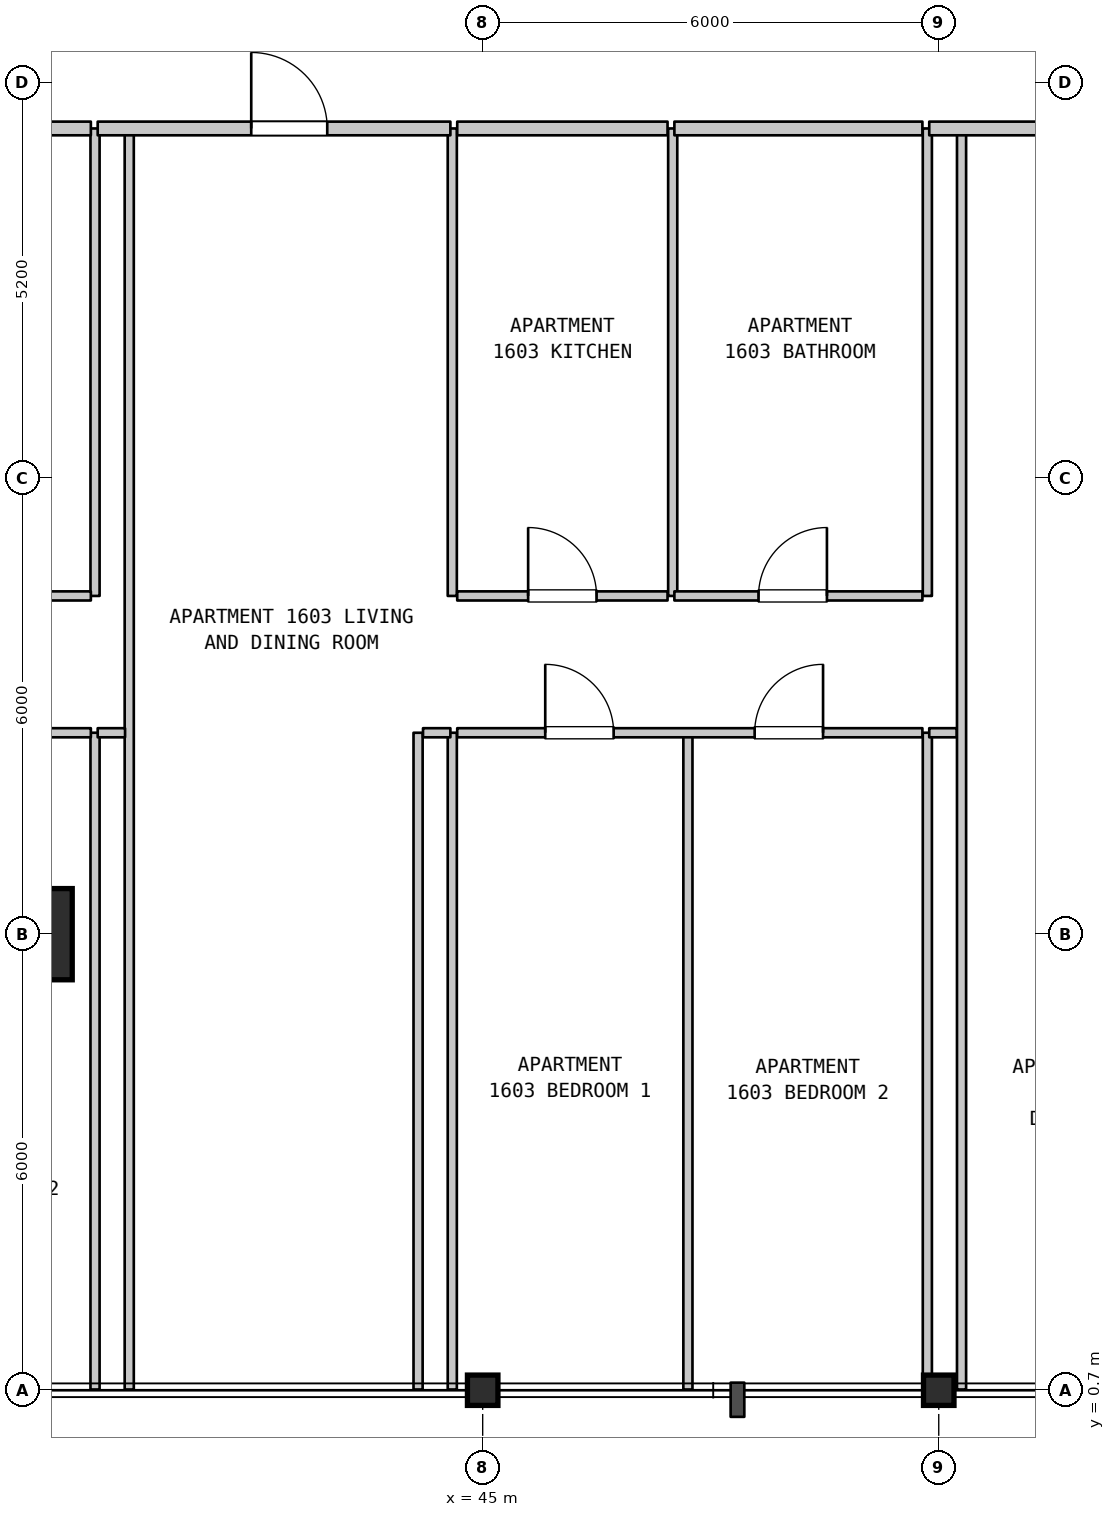
"""IFC4 building model, lengths in metres.
Left out: names, types, materials, properties, quantities, classifications, styles, units other than length and angle.
Written with IfcOpenShell. Run it as: python <this file> out.ifc"""

import sys

from ifc_helpers import new_model, si_unit, direction, frame, frame_2d, origin, origin_2d, place, context, subcontext, project, spatial, rectangle, i_section, extrude, element, fill, save


model = new_model("IFC4")
c1 = context("Model", 3, precision=1e-05, world=origin(), true_north=direction((0.0, 1.0)))
c2 = subcontext(c1, "Body", "Model", "MODEL_VIEW")
j1 = project(units=[si_unit("LENGTHUNIT", "METRE"), si_unit("PLANEANGLEUNIT", "RADIAN")], contexts=[c1])
p1 = place(None, origin())
s1 = spatial("IfcSite", under=j1, at=p1, CompositionType="ELEMENT")
p2 = place(p1, origin())
s2 = spatial("IfcBuilding", under=s1, at=p2, CompositionType="ELEMENT")
p3 = place(p2, frame((0.0, 0.0, 70.1)))
s3 = spatial("IfcBuildingStorey", under=s2, at=p3, CompositionType="ELEMENT", Elevation=70.1)
p4 = place(p3, frame((39.0, 6.7, 0.0), z_axis=(0.0, 0.0, 1.0), x_axis=(1.0, 0.0, 0.0)))
e1 = element("IfcColumn", 1, at=p4, inside=s3, PredefinedType="COLUMN", context=c2, shape_type="SweptSolid", body=[
    extrude(rectangle(XDim=1.2, YDim=1.2, at=origin_2d()), origin(), (0.0, 0.0, 1.0), 3.7),
])
for number, where, z_axis, x_axis in (
    (2, (45.0, 0.7, 0.0), (0.0, 0.0, 1.0), (1.0, 0.0, 0.0)),
    (3, (51.0, 0.7, 0.0), (0.0, 0.0, 1.0), (1.0, 0.0, 0.0)),
):
    element("IfcColumn", number, at=place(p3, frame(where, z_axis=z_axis, x_axis=x_axis)), inside=s3, PredefinedType="COLUMN", context=c2, shape_type="SweptSolid", body=[
        extrude(i_section(OverallWidth=0.401, OverallDepth=0.399, WebThickness=0.025, FlangeThickness=0.04, FilletRadius=0.015, at=origin_2d()), origin(), (0.0, 0.0, 1.0), 3.7),
    ])
p5 = place(p3, frame((39.9, 0.71, 0.0), z_axis=(0.0, 0.0, 1.0), x_axis=(0.0, 1.0, 0.0)))
e4 = element("IfcWall", 4, at=p5, inside=s3, PredefinedType="PARTITIONING", context=c2, shape_type="SweptSolid", body=[
    extrude(rectangle(XDim=8.64, YDim=0.12, at=frame_2d((4.32, 0.0))), origin(), (0.0, 0.0, 1.0), 3.385),
])
p6 = place(p3, frame((39.9, 11.15, 0.0), z_axis=(0.0, 0.0, 1.0), x_axis=(0.0, 1.0, 0.0)))
e5 = element("IfcWall", 5, at=p6, inside=s3, PredefinedType="PARTITIONING", context=c2, shape_type="SweptSolid", body=[
    extrude(rectangle(XDim=6.15, YDim=0.12, at=frame_2d((3.075, 0.0))), origin(), (0.0, 0.0, 1.0), 3.385),
])
p7 = place(p3, frame((40.35, 0.71, 0.0), z_axis=(0.0, 0.0, 1.0), x_axis=(0.0, 1.0, 0.0)))
e6 = element("IfcWall", 6, at=p7, inside=s3, PredefinedType="PARTITIONING", context=c2, shape_type="SweptSolid", body=[
    extrude(rectangle(XDim=16.59, YDim=0.12, at=frame_2d((8.295, 0.0))), origin(), (0.0, 0.0, 1.0), 3.385),
])
for number, where, z_axis, x_axis in (
    (7, (44.15, 0.71, 0.0), (0.0, 0.0, 1.0), (0.0, 1.0, 0.0)),
    (8, (44.6, 0.71, 0.0), (0.0, 0.0, 1.0), (0.0, 1.0, 0.0)),
):
    element("IfcWall", number, at=place(p3, frame(where, z_axis=z_axis, x_axis=x_axis)), inside=s3, PredefinedType="PARTITIONING", context=c2, shape_type="SweptSolid", body=[
        extrude(rectangle(XDim=8.64, YDim=0.12, at=frame_2d((4.32, 0.0))), origin(), (0.0, 0.0, 1.0), 3.385),
    ])
for number, where, z_axis, x_axis in (
    (9, (44.6, 11.15, 0.0), (0.0, 0.0, 1.0), (0.0, 1.0, 0.0)),
    (10, (47.5, 11.15, 0.0), (0.0, 0.0, 1.0), (0.0, 1.0, 0.0)),
):
    element("IfcWall", number, at=place(p3, frame(where, z_axis=z_axis, x_axis=x_axis)), inside=s3, PredefinedType="PARTITIONING", context=c2, shape_type="SweptSolid", body=[
        extrude(rectangle(XDim=6.15, YDim=0.12, at=frame_2d((3.075, 0.0))), origin(), (0.0, 0.0, 1.0), 3.385),
    ])
for number, where, z_axis, x_axis in (
    (11, (47.7, 0.71, 0.0), (0.0, 0.0, 1.0), (0.0, 1.0, 0.0)),
    (12, (50.85, 0.71, 0.0), (0.0, 0.0, 1.0), (0.0, 1.0, 0.0)),
):
    element("IfcWall", number, at=place(p3, frame(where, z_axis=z_axis, x_axis=x_axis)), inside=s3, PredefinedType="PARTITIONING", context=c2, shape_type="SweptSolid", body=[
        extrude(rectangle(XDim=8.64, YDim=0.12, at=frame_2d((4.32, 0.0))), origin(), (0.0, 0.0, 1.0), 3.385),
    ])
p8 = place(p3, frame((50.85, 11.15, 0.0), z_axis=(0.0, 0.0, 1.0), x_axis=(0.0, 1.0, 0.0)))
e13 = element("IfcWall", 13, at=p8, inside=s3, PredefinedType="PARTITIONING", context=c2, shape_type="SweptSolid", body=[
    extrude(rectangle(XDim=6.15, YDim=0.12, at=frame_2d((3.075, 0.0))), origin(), (0.0, 0.0, 1.0), 3.385),
])
p9 = place(p3, frame((51.3, 0.71, 0.0), z_axis=(0.0, 0.0, 1.0), x_axis=(0.0, 1.0, 0.0)))
e14 = element("IfcWall", 14, at=p9, inside=s3, PredefinedType="PARTITIONING", context=c2, shape_type="SweptSolid", body=[
    extrude(rectangle(XDim=16.59, YDim=0.12, at=frame_2d((8.295, 0.0))), origin(), (0.0, 0.0, 1.0), 3.385),
])
p10 = place(p3, frame((33.785, 9.35, 0.0), z_axis=(0.0, 0.0, 1.0), x_axis=(1.0, 0.0, 0.0)))
e15 = element("IfcWall", 15, at=p10, inside=s3, PredefinedType="PARTITIONING", context=c2, shape_type="SweptSolid", body=[
    extrude(rectangle(XDim=6.06, YDim=0.12, at=frame_2d((3.03, 0.0))), origin(), (0.0, 0.0, 1.0), 3.385),
])
p11 = place(p10, frame((1.144, 0.0, 0.0)))
e16 = element("IfcOpeningElement", 16, at=p11, cuts=e15, PredefinedType="OPENING", context=c2, shape_type="SweptSolid", body=[
    extrude(rectangle(XDim=0.9, YDim=2.15, at=frame_2d((0.45, 1.075))), frame((0.0, 0.07, 0.0), z_axis=(0.0, -1.0, 0.0), x_axis=(1.0, 0.0, 0.0)), (0.0, 0.0, 1.0), 0.14),
])
p12 = place(p10, frame((3.869, 0.0, 0.0)))
e17 = element("IfcOpeningElement", 17, at=p12, cuts=e15, PredefinedType="OPENING", context=c2, shape_type="SweptSolid", body=[
    extrude(rectangle(XDim=0.9, YDim=2.15, at=frame_2d((0.45, 1.075))), frame((0.0, 0.07, 0.0), z_axis=(0.0, -1.0, 0.0), x_axis=(1.0, 0.0, 0.0)), (0.0, 0.0, 1.0), 0.14),
])
for number, where, z_axis, x_axis in (
    (18, (39.935, 9.35, 0.0), (0.0, 0.0, 1.0), (1.0, 0.0, 0.0)),
    (19, (44.215, 9.35, 0.0), (0.0, 0.0, 1.0), (1.0, 0.0, 0.0)),
):
    element("IfcWall", number, at=place(p3, frame(where, z_axis=z_axis, x_axis=x_axis)), inside=s3, PredefinedType="PARTITIONING", context=c2, shape_type="SweptSolid", body=[
        extrude(rectangle(XDim=0.36, YDim=0.12, at=frame_2d((0.18, 0.0))), origin(), (0.0, 0.0, 1.0), 3.385),
    ])
p13 = place(p3, frame((44.665, 9.35, 0.0), z_axis=(0.0, 0.0, 1.0), x_axis=(1.0, 0.0, 0.0)))
e20 = element("IfcWall", 20, at=p13, inside=s3, PredefinedType="PARTITIONING", context=c2, shape_type="SweptSolid", body=[
    extrude(rectangle(XDim=6.12, YDim=0.12, at=frame_2d((3.06, 0.0))), origin(), (0.0, 0.0, 1.0), 3.385),
])
p14 = place(p13, frame((1.158, 0.0, 0.0)))
e21 = element("IfcOpeningElement", 21, at=p14, cuts=e20, PredefinedType="OPENING", context=c2, shape_type="SweptSolid", body=[
    extrude(rectangle(XDim=0.9, YDim=2.15, at=frame_2d((0.45, 1.075))), frame((0.0, 0.07, 0.0), z_axis=(0.0, -1.0, 0.0), x_axis=(1.0, 0.0, 0.0)), (0.0, 0.0, 1.0), 0.14),
])
p15 = place(p13, frame((3.913, 0.0, 0.0)))
e22 = element("IfcOpeningElement", 22, at=p15, cuts=e20, PredefinedType="OPENING", context=c2, shape_type="SweptSolid", body=[
    extrude(rectangle(XDim=0.9, YDim=2.15, at=frame_2d((0.45, 1.075))), frame((0.0, 0.07, 0.0), z_axis=(0.0, -1.0, 0.0), x_axis=(1.0, 0.0, 0.0)), (0.0, 0.0, 1.0), 0.14),
])
p16 = place(p3, frame((50.875, 9.35, 0.0), z_axis=(0.0, 0.0, 1.0), x_axis=(1.0, 0.0, 0.0)))
e23 = element("IfcWall", 23, at=p16, inside=s3, PredefinedType="PARTITIONING", context=c2, shape_type="SweptSolid", body=[
    extrude(rectangle(XDim=0.36, YDim=0.12, at=frame_2d((0.18, 0.0))), origin(), (0.0, 0.0, 1.0), 3.385),
])
p17 = place(p3, frame((36.614, 11.15, 0.0), z_axis=(0.0, 0.0, 1.0), x_axis=(1.0, 0.0, 0.0)))
e24 = element("IfcWall", 24, at=p17, inside=s3, PredefinedType="PARTITIONING", context=c2, shape_type="SweptSolid", body=[
    extrude(rectangle(XDim=3.231, YDim=0.12, at=frame_2d((1.615, 0.0))), origin(), (0.0, 0.0, 1.0), 3.385),
])
p18 = place(p17, frame((1.092, 0.0, 0.0)))
e25 = element("IfcOpeningElement", 25, at=p18, cuts=e24, PredefinedType="OPENING", context=c2, shape_type="SweptSolid", body=[
    extrude(rectangle(XDim=0.9, YDim=2.1, at=frame_2d((0.45, 1.05))), frame((0.0, 0.07, 0.0), z_axis=(0.0, -1.0, 0.0), x_axis=(1.0, 0.0, 0.0)), (0.0, 0.0, 1.0), 0.14),
])
p19 = place(p3, frame((44.665, 11.15, 0.0), z_axis=(0.0, 0.0, 1.0), x_axis=(1.0, 0.0, 0.0)))
e26 = element("IfcWall", 26, at=p19, inside=s3, PredefinedType="PARTITIONING", context=c2, shape_type="SweptSolid", body=[
    extrude(rectangle(XDim=2.767, YDim=0.12, at=frame_2d((1.383, 0.0))), origin(), (0.0, 0.0, 1.0), 3.385),
])
p20 = place(p19, frame((0.933, 0.0, 0.0)))
e27 = element("IfcOpeningElement", 27, at=p20, cuts=e26, PredefinedType="OPENING", context=c2, shape_type="SweptSolid", body=[
    extrude(rectangle(XDim=0.9, YDim=2.15, at=frame_2d((0.45, 1.075))), frame((0.0, 0.07, 0.0), z_axis=(0.0, -1.0, 0.0), x_axis=(1.0, 0.0, 0.0)), (0.0, 0.0, 1.0), 0.14),
])
p21 = place(p3, frame((47.522, 11.15, 0.0), z_axis=(0.0, 0.0, 1.0), x_axis=(1.0, 0.0, 0.0)))
e28 = element("IfcWall", 28, at=p21, inside=s3, PredefinedType="PARTITIONING", context=c2, shape_type="SweptSolid", body=[
    extrude(rectangle(XDim=3.263, YDim=0.12, at=frame_2d((1.631, 0.0))), origin(), (0.0, 0.0, 1.0), 3.385),
])
p22 = place(p21, frame((1.107, 0.0, 0.0)))
e29 = element("IfcOpeningElement", 29, at=p22, cuts=e28, PredefinedType="OPENING", context=c2, shape_type="SweptSolid", body=[
    extrude(rectangle(XDim=0.9, YDim=2.1, at=frame_2d((0.45, 1.05))), frame((0.0, 0.07, 0.0), z_axis=(0.0, -1.0, 0.0), x_axis=(1.0, 0.0, 0.0)), (0.0, 0.0, 1.0), 0.14),
])
p23 = place(p3, frame((36.614, 17.3, 0.0), z_axis=(0.0, 0.0, 1.0), x_axis=(1.0, 0.0, 0.0)))
e30 = element("IfcWall", 30, at=p23, inside=s3, PredefinedType="STANDARD", context=c2, shape_type="SweptSolid", body=[
    extrude(rectangle(XDim=3.231, YDim=0.18, at=frame_2d((1.615, 0.0))), origin(), (0.0, 0.0, 1.0), 3.385),
])
p24 = place(p3, frame((39.935, 17.3, 0.0), z_axis=(0.0, 0.0, 1.0), x_axis=(1.0, 0.0, 0.0)))
e31 = element("IfcWall", 31, at=p24, inside=s3, PredefinedType="STANDARD", context=c2, shape_type="SweptSolid", body=[
    extrude(rectangle(XDim=4.64, YDim=0.18, at=frame_2d((2.32, 0.0))), origin(), (0.0, 0.0, 1.0), 3.385),
])
p25 = place(p24, frame((2.02, 0.0, 0.0)))
e32 = element("IfcOpeningElement", 32, at=p25, cuts=e31, PredefinedType="OPENING", context=c2, shape_type="SweptSolid", body=[
    extrude(rectangle(XDim=1.0, YDim=2.15, at=frame_2d((0.5, 1.075))), frame((0.0, 0.1, 0.0), z_axis=(0.0, -1.0, 0.0), x_axis=(1.0, 0.0, 0.0)), (0.0, 0.0, 1.0), 0.2),
])
p26 = place(p3, frame((44.665, 17.3, 0.0), z_axis=(0.0, 0.0, 1.0), x_axis=(1.0, 0.0, 0.0)))
e33 = element("IfcWall", 33, at=p26, inside=s3, PredefinedType="STANDARD", context=c2, shape_type="SweptSolid", body=[
    extrude(rectangle(XDim=2.767, YDim=0.18, at=frame_2d((1.383, 0.0))), origin(), (0.0, 0.0, 1.0), 3.385),
])
p27 = place(p3, frame((47.522, 17.3, 0.0), z_axis=(0.0, 0.0, 1.0), x_axis=(1.0, 0.0, 0.0)))
e34 = element("IfcWall", 34, at=p27, inside=s3, PredefinedType="STANDARD", context=c2, shape_type="SweptSolid", body=[
    extrude(rectangle(XDim=3.263, YDim=0.18, at=frame_2d((1.631, 0.0))), origin(), (0.0, 0.0, 1.0), 3.385),
])
p28 = place(p3, frame((50.875, 17.3, 0.0), z_axis=(0.0, 0.0, 1.0), x_axis=(1.0, 0.0, 0.0)))
e35 = element("IfcWall", 35, at=p28, inside=s3, PredefinedType="STANDARD", context=c2, shape_type="SweptSolid", body=[
    extrude(rectangle(XDim=3.96, YDim=0.18, at=frame_2d((1.98, 0.0))), origin(), (0.0, 0.0, 1.0), 3.385),
])
p29 = place(p28, frame((1.609, 0.0, 0.0)))
e36 = element("IfcOpeningElement", 36, at=p29, cuts=e35, PredefinedType="OPENING", context=c2, shape_type="SweptSolid", body=[
    extrude(rectangle(XDim=1.0, YDim=2.15, at=frame_2d((0.5, 1.075))), frame((0.0, 0.1, 0.0), z_axis=(0.0, -1.0, 0.0), x_axis=(1.0, 0.0, 0.0)), (0.0, 0.0, 1.0), 0.2),
])
p30 = place(p14, origin())
e37 = element("IfcDoor", 37, at=p30, inside=s3, OperationType="SINGLE_SWING_LEFT", PredefinedType="DOOR", context=c2, shape_type="SweptSolid", body=[
    extrude(rectangle(XDim=0.9, YDim=2.15, at=frame_2d((0.45, 1.075))), frame((0.0, 0.025, 0.0), z_axis=(0.0, -1.0, 0.0), x_axis=(1.0, 0.0, 0.0)), (0.0, 0.0, 1.0), 0.05),
])
fill(e21, e37)
p31 = place(p15, origin())
e38 = element("IfcDoor", 38, at=p31, inside=s3, OperationType="SINGLE_SWING_RIGHT", PredefinedType="DOOR", context=c2, shape_type="SweptSolid", body=[
    extrude(rectangle(XDim=0.9, YDim=2.15, at=frame_2d((0.45, 1.075))), frame((0.0, 0.025, 0.0), z_axis=(0.0, -1.0, 0.0), x_axis=(1.0, 0.0, 0.0)), (0.0, 0.0, 1.0), 0.05),
])
fill(e22, e38)
p32 = place(p20, origin())
e39 = element("IfcDoor", 39, at=p32, inside=s3, OperationType="SINGLE_SWING_LEFT", PredefinedType="DOOR", context=c2, shape_type="SweptSolid", body=[
    extrude(rectangle(XDim=0.9, YDim=2.15, at=frame_2d((0.45, 1.075))), frame((0.0, 0.025, 0.0), z_axis=(0.0, -1.0, 0.0), x_axis=(1.0, 0.0, 0.0)), (0.0, 0.0, 1.0), 0.05),
])
fill(e27, e39)
p33 = place(p22, origin())
e40 = element("IfcDoor", 40, at=p33, inside=s3, OperationType="SINGLE_SWING_RIGHT", PredefinedType="DOOR", context=c2, shape_type="SweptSolid", body=[
    extrude(rectangle(XDim=0.9, YDim=2.1, at=frame_2d((0.45, 1.05))), frame((0.0, 0.025, 0.0), z_axis=(0.0, -1.0, 0.0), x_axis=(1.0, 0.0, 0.0)), (0.0, 0.0, 1.0), 0.05),
])
fill(e29, e40)
p34 = place(p25, origin())
e41 = element("IfcDoor", 41, at=p34, inside=s3, OperationType="SINGLE_SWING_LEFT", PredefinedType="DOOR", context=c2, shape_type="SweptSolid", body=[
    extrude(rectangle(XDim=1.0, YDim=2.15, at=frame_2d((0.5, 1.075))), frame((0.0, 0.025, 0.0), z_axis=(0.0, -1.0, 0.0), x_axis=(1.0, 0.0, 0.0)), (0.0, 0.0, 1.0), 0.05),
])
fill(e32, e41)
save(model, sys.argv[1])
